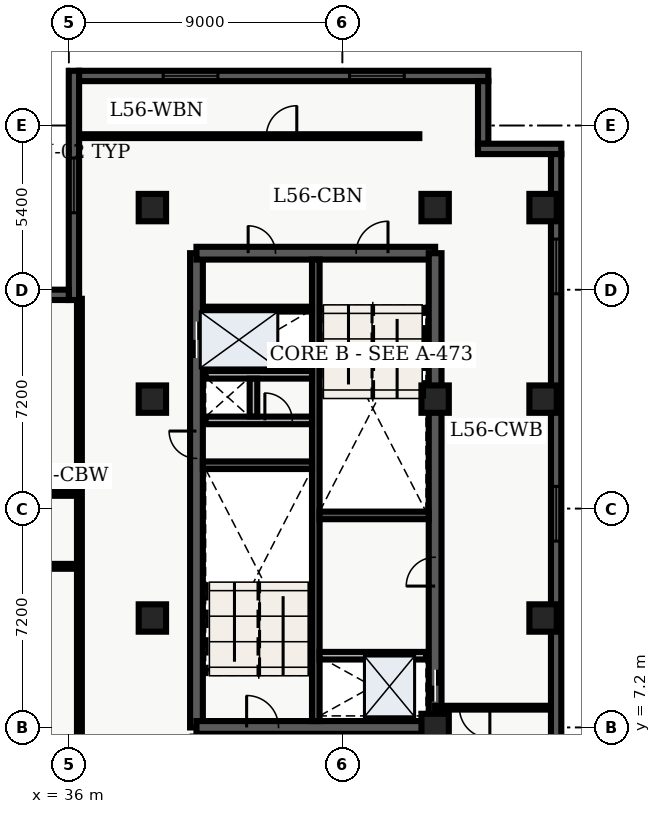
"""IFC4 building model, lengths in metres.
Left out: names, types, materials, properties, quantities, classifications, styles, units other than length and angle.
Written with IfcOpenShell. Run it as: python <this file> out.ifc"""

import sys

from ifc_helpers import new_model, entity, si_unit, converted_unit, direction, frame, origin_with_axes, origin_2d_with_axis, place, context, subcontext, project, spatial, polyline, rectangle, outline, extrude, element, fill, save


model = new_model("IFC4")
c1 = context("Model", 3, precision=1e-05, world=origin_with_axes(), true_north=direction((0.0, 1.0)))
c2 = subcontext(c1, "Body", "Model", "MODEL_VIEW")
j1 = project(units=[si_unit("LENGTHUNIT", "METRE"), converted_unit("PLANEANGLEUNIT", "DEGREE", entity("IfcPlaneAngleMeasure", 0.017), si_unit("PLANEANGLEUNIT", "RADIAN"), dimensions=[0, 0, 0, 0, 0, 0, 0])], contexts=[c1])
p1 = place(None, origin_with_axes())
s1 = spatial("IfcSite", under=j1, at=p1, CompositionType="ELEMENT")
p2 = place(p1, origin_with_axes())
s2 = spatial("IfcBuilding", under=s1, at=p2, CompositionType="ELEMENT")
p3 = place(p2, frame((0.0, 0.0, 228.6), z_axis=(0.0, 0.0, 1.0), x_axis=(1.0, 0.0, 0.0)))
s3 = spatial("IfcBuildingStorey", under=s2, at=p3, CompositionType="ELEMENT", Elevation=228.6)
p4 = place(p3, frame((40.2, 7.2, 0.0), z_axis=(0.0, 0.0, 1.0), x_axis=(0.0, 1.0, 0.0)))
e1 = element("IfcWall", 1, at=p4, inside=s3, PredefinedType="SHEAR", context=c2, shape_type="SweptSolid", body=[
    extrude(outline(polyline([(0.0, -0.21), (15.6, -0.21), (15.6, 0.21), (0.0, 0.21), (0.0, -0.21)])), origin_with_axes(), (0.0, 0.0, 1.0), 3.66),
])
p5 = place(p4, frame((12.75, 0.0, 0.0), z_axis=(0.0, 0.0, 1.0), x_axis=(1.0, 0.0, 0.0)))
e2 = element("IfcOpeningElement", 2, at=p5, cuts=e1, PredefinedType="OPENING", context=c2, shape_type="SweptSolid", body=[
    extrude(rectangle(XDim=1.2, YDim=0.44, at=origin_2d_with_axis()), origin_with_axes(), (0.0, 0.0, 1.0), 2.15),
])
p6 = place(p4, frame((9.3, 0.0, 0.0), z_axis=(0.0, 0.0, 1.0), x_axis=(1.0, 0.0, 0.0)))
e3 = element("IfcOpeningElement", 3, at=p6, cuts=e1, PredefinedType="OPENING", context=c2, shape_type="SweptSolid", body=[
    extrude(rectangle(XDim=0.9, YDim=0.44, at=origin_2d_with_axis()), origin_with_axes(), (0.0, 0.0, 1.0), 2.15),
])
p7 = place(p3, frame((40.2, 7.2, 0.0), z_axis=(0.0, 0.0, 1.0), x_axis=(1.0, 0.0, 0.0)))
e4 = element("IfcWall", 4, at=p7, inside=s3, PredefinedType="SHEAR", context=c2, shape_type="SweptSolid", body=[
    extrude(outline(polyline([(0.0, -0.21), (7.85, -0.21), (7.85, 0.21), (0.0, 0.21), (0.0, -0.21)])), origin_with_axes(), (0.0, 0.0, 1.0), 3.66),
])
p8 = place(p7, frame((2.175, 0.0, 0.0), z_axis=(0.0, 0.0, 1.0), x_axis=(1.0, 0.0, 0.0)))
e5 = element("IfcOpeningElement", 5, at=p8, cuts=e4, PredefinedType="OPENING", context=c2, shape_type="SweptSolid", body=[
    extrude(rectangle(XDim=1.05, YDim=0.44, at=origin_2d_with_axis()), origin_with_axes(), (0.0, 0.0, 1.0), 2.15),
])
p9 = place(p3, frame((40.2, 22.8, 0.0), z_axis=(0.0, 0.0, 1.0), x_axis=(1.0, 0.0, 0.0)))
e6 = element("IfcWall", 6, at=p9, inside=s3, PredefinedType="SHEAR", context=c2, shape_type="SweptSolid", body=[
    extrude(outline(polyline([(0.0, -0.21), (7.85, -0.21), (7.85, 0.21), (0.0, 0.21), (0.0, -0.21)])), origin_with_axes(), (0.0, 0.0, 1.0), 3.66),
])
p10 = place(p9, frame((5.775, 0.0, 0.0), z_axis=(0.0, 0.0, 1.0), x_axis=(1.0, 0.0, 0.0)))
e7 = element("IfcOpeningElement", 7, at=p10, cuts=e6, PredefinedType="OPENING", context=c2, shape_type="SweptSolid", body=[
    extrude(rectangle(XDim=1.05, YDim=0.44, at=origin_2d_with_axis()), origin_with_axes(), (0.0, 0.0, 1.0), 2.15),
])
p11 = place(p9, frame((2.15, 0.0, 0.0), z_axis=(0.0, 0.0, 1.0), x_axis=(1.0, 0.0, 0.0)))
e8 = element("IfcOpeningElement", 8, at=p11, cuts=e6, PredefinedType="OPENING", context=c2, shape_type="SweptSolid", body=[
    extrude(rectangle(XDim=0.9, YDim=0.44, at=origin_2d_with_axis()), origin_with_axes(), (0.0, 0.0, 1.0), 2.15),
])
p12 = place(p3, frame((48.05, 7.2, 0.0), z_axis=(0.0, 0.0, 1.0), x_axis=(0.0, 1.0, 0.0)))
e9 = element("IfcWall", 9, at=p12, inside=s3, PredefinedType="SHEAR", context=c2, shape_type="SweptSolid", body=[
    extrude(outline(polyline([(0.0, -0.21), (15.6, -0.21), (15.6, 0.21), (0.0, 0.21), (0.0, -0.21)])), origin_with_axes(), (0.0, 0.0, 1.0), 3.66),
])
p13 = place(p12, frame((1.375, 0.0, 0.0), z_axis=(0.0, 0.0, 1.0), x_axis=(1.0, 0.0, 0.0)))
e10 = element("IfcOpeningElement", 10, at=p13, cuts=e9, PredefinedType="OPENING", context=c2, shape_type="SweptSolid", body=[
    extrude(rectangle(XDim=1.05, YDim=0.44, at=origin_2d_with_axis()), origin_with_axes(), (0.0, 0.0, 1.0), 2.15),
])
p14 = place(p12, frame((5.125, 0.0, 0.0), z_axis=(0.0, 0.0, 1.0), x_axis=(1.0, 0.0, 0.0)))
e11 = element("IfcOpeningElement", 11, at=p14, cuts=e9, PredefinedType="OPENING", context=c2, shape_type="SweptSolid", body=[
    extrude(rectangle(XDim=0.95, YDim=0.44, at=origin_2d_with_axis()), origin_with_axes(), (0.0, 0.0, 1.0), 2.15),
])
p15 = place(p3, frame((44.125, 7.41, 0.0), z_axis=(0.0, 0.0, 1.0), x_axis=(0.0, 1.0, 0.0)))
e12 = element("IfcWall", 12, at=p15, inside=s3, PredefinedType="SHEAR", context=c2, shape_type="SweptSolid", body=[
    extrude(outline(polyline([(0.0, -0.125), (15.18, -0.125), (15.18, 0.125), (0.0, 0.125), (0.0, -0.125)])), origin_with_axes(), (0.0, 0.0, 1.0), 3.66),
])
for number, where, z_axis, x_axis in (
    (13, (40.41, 15.825, 0.0), (0.0, 0.0, 1.0), (1.0, 0.0, 0.0)),
    (14, (44.25, 14.175, 0.0), (0.0, 0.0, 1.0), (1.0, 0.0, 0.0)),
):
    element("IfcWall", number, at=place(p3, frame(where, z_axis=z_axis, x_axis=x_axis)), inside=s3, PredefinedType="SHEAR", context=c2, shape_type="SweptSolid", body=[
        extrude(outline(polyline([(0.0, -0.125), (3.59, -0.125), (3.59, 0.125), (0.0, 0.125), (0.0, -0.125)])), origin_with_axes(), (0.0, 0.0, 1.0), 3.66),
    ])
p16 = place(p3, frame((40.5, 17.3, 0.0), z_axis=(0.0, 0.0, 1.0), x_axis=(1.0, 0.0, 0.0)))
e15 = element("IfcWall", 15, at=p16, inside=s3, PredefinedType="SOLIDWALL", context=c2, shape_type="SweptSolid", body=[
    extrude(outline(polyline([(0.0, -0.125), (3.5, -0.125), (3.5, 0.125), (0.0, 0.125), (0.0, -0.125)])), origin_with_axes(), (0.0, 0.0, 1.0), 2.7),
])
p17 = place(p16, frame((2.4, 0.0, 0.0), z_axis=(0.0, 0.0, 1.0), x_axis=(1.0, 0.0, 0.0)))
e16 = element("IfcOpeningElement", 16, at=p17, cuts=e15, PredefinedType="OPENING", context=c2, shape_type="SweptSolid", body=[
    extrude(rectangle(XDim=0.9, YDim=0.27, at=origin_2d_with_axis()), origin_with_axes(), (0.0, 0.0, 1.0), 2.15),
])
p18 = place(p3, frame((40.5, 18.8, 0.0), z_axis=(0.0, 0.0, 1.0), x_axis=(1.0, 0.0, 0.0)))
e17 = element("IfcWall", 17, at=p18, inside=s3, PredefinedType="SOLIDWALL", context=c2, shape_type="SweptSolid", body=[
    extrude(outline(polyline([(0.0, -0.125), (3.5, -0.125), (3.5, 0.125), (0.0, 0.125), (0.0, -0.125)])), origin_with_axes(), (0.0, 0.0, 1.0), 2.7),
])
p19 = place(p3, frame((42.075, 17.43, 0.0), z_axis=(0.0, 0.0, 1.0), x_axis=(0.0, 1.0, 0.0)))
e18 = element("IfcWall", 18, at=p19, inside=s3, PredefinedType="SOLIDWALL", context=c2, shape_type="SweptSolid", body=[
    extrude(outline(polyline([(0.0, -0.125), (1.24, -0.125), (1.24, 0.125), (0.0, 0.125), (0.0, -0.125)])), origin_with_axes(), (0.0, 0.0, 1.0), 2.7),
])
for number, where, z_axis, x_axis in (
    (19, (38.75, 10.8, 0.0), (0.0, 0.0, 1.0), (1.0, 0.0, 0.0)),
    (20, (38.75, 18.0, 0.0), (0.0, 0.0, 1.0), (1.0, 0.0, 0.0)),
    (21, (38.75, 24.3, 0.0), (0.0, 0.0, 1.0), (1.0, 0.0, 0.0)),
    (22, (48.05, 7.2, 0.0), (0.0, 0.0, 1.0), (1.0, 0.0, 0.0)),
    (23, (48.05, 18.0, 0.0), (0.0, 0.0, 1.0), (1.0, 0.0, 0.0)),
    (24, (48.05, 24.3, 0.0), (0.0, 0.0, 1.0), (1.0, 0.0, 0.0)),
    (25, (51.6, 10.8, 0.0), (0.0, 0.0, 1.0), (1.0, 0.0, 0.0)),
    (26, (51.6, 18.0, 0.0), (0.0, 0.0, 1.0), (1.0, 0.0, 0.0)),
    (27, (51.6, 24.3, 0.0), (0.0, 0.0, 1.0), (1.0, 0.0, 0.0)),
):
    element("IfcColumn", number, at=place(p3, frame(where, z_axis=z_axis, x_axis=x_axis)), inside=s3, PredefinedType="COLUMN", context=c2, shape_type="SweptSolid", body=[
        extrude(rectangle(XDim=0.9, YDim=0.9, at=origin_2d_with_axis()), origin_with_axes(), (0.0, 0.0, 1.0), 3.9),
    ])
p20 = place(p3, frame((40.5, 20.96, 0.0), z_axis=(0.0, 0.0, 1.0), x_axis=(1.0, 0.0, 0.0)))
e28 = element("IfcWall", 28, at=p20, inside=s3, PredefinedType="PARTITIONING", context=c2, shape_type="SweptSolid", body=[
    extrude(outline(polyline([(0.0, -0.08), (3.5, -0.08), (3.5, 0.08), (0.0, 0.08), (0.0, -0.08)])), origin_with_axes(), (0.0, 0.0, 1.0), 2.7),
])
p21 = place(p3, frame((44.25, 9.56, 0.0), z_axis=(0.0, 0.0, 1.0), x_axis=(1.0, 0.0, 0.0)))
e29 = element("IfcWall", 29, at=p21, inside=s3, PredefinedType="SOLIDWALL", context=c2, shape_type="SweptSolid", body=[
    extrude(outline(polyline([(0.0, -0.125), (3.5, -0.125), (3.5, 0.125), (0.0, 0.125), (0.0, -0.125)])), origin_with_axes(), (0.0, 0.0, 1.0), 2.7),
])
p22 = place(p3, frame((20.3, 12.5, 0.0), z_axis=(0.0, 0.0, 1.0), x_axis=(1.0, 0.0, 0.0)))
e30 = element("IfcWall", 30, at=p22, inside=s3, PredefinedType="PARTITIONING", context=c2, shape_type="SweptSolid", body=[
    extrude(outline(polyline([(0.0, -0.08), (16.05, -0.08), (16.05, 0.08), (0.0, 0.08), (0.0, -0.08)])), origin_with_axes(), (0.0, 0.0, 1.0), 2.7),
])
p23 = place(p22, frame((3.865, 0.0, 0.0), z_axis=(0.0, 0.0, 1.0), x_axis=(1.0, 0.0, 0.0)))
e31 = element("IfcOpeningElement", 31, at=p23, cuts=e30, PredefinedType="OPENING", context=c2, shape_type="SweptSolid", body=[
    extrude(rectangle(XDim=1.2, YDim=0.18, at=origin_2d_with_axis()), origin_with_axes(), (0.0, 0.0, 1.0), 2.2),
])
p24 = place(p22, frame((9.48, 0.0, 0.0), z_axis=(0.0, 0.0, 1.0), x_axis=(1.0, 0.0, 0.0)))
e32 = element("IfcOpeningElement", 32, at=p24, cuts=e30, PredefinedType="OPENING", context=c2, shape_type="SweptSolid", body=[
    extrude(rectangle(XDim=1.0, YDim=0.18, at=origin_2d_with_axis()), origin_with_axes(), (0.0, 0.0, 1.0), 2.15),
])
p25 = place(p22, frame((13.691, 0.0, 0.0), z_axis=(0.0, 0.0, 1.0), x_axis=(1.0, 0.0, 0.0)))
e33 = element("IfcOpeningElement", 33, at=p25, cuts=e30, PredefinedType="OPENING", context=c2, shape_type="SweptSolid", body=[
    extrude(rectangle(XDim=1.0, YDim=0.18, at=origin_2d_with_axis()), origin_with_axes(), (0.0, 0.0, 1.0), 2.15),
])
p26 = place(p3, frame((20.3, 14.9, 0.0), z_axis=(0.0, 0.0, 1.0), x_axis=(1.0, 0.0, 0.0)))
e34 = element("IfcWall", 34, at=p26, inside=s3, PredefinedType="PARTITIONING", context=c2, shape_type="SweptSolid", body=[
    extrude(outline(polyline([(0.0, -0.08), (16.05, -0.08), (16.05, 0.08), (0.0, 0.08), (0.0, -0.08)])), origin_with_axes(), (0.0, 0.0, 1.0), 2.7),
])
p27 = place(p26, frame((8.075, 0.0, 0.0), z_axis=(0.0, 0.0, 1.0), x_axis=(1.0, 0.0, 0.0)))
e35 = element("IfcOpeningElement", 35, at=p27, cuts=e34, PredefinedType="OPENING", context=c2, shape_type="SweptSolid", body=[
    extrude(rectangle(XDim=1.2, YDim=0.18, at=origin_2d_with_axis()), origin_with_axes(), (0.0, 0.0, 1.0), 2.2),
])
p28 = place(p3, frame((36.35, 4.35, 0.0), z_axis=(0.0, 0.0, 1.0), x_axis=(0.0, 1.0, 0.0)))
e36 = element("IfcWall", 36, at=p28, inside=s3, PredefinedType="PARTITIONING", context=c2, shape_type="SweptSolid", body=[
    extrude(outline(polyline([(0.0, -0.08), (16.95, -0.08), (16.95, 0.08), (0.0, 0.08), (0.0, -0.08)])), origin_with_axes(), (0.0, 0.0, 1.0), 2.7),
])
p29 = place(p3, frame((51.865, 7.85, 0.0), z_axis=(0.0, 0.0, 1.0), x_axis=(-1.0, 0.0, 0.0)))
e37 = element("IfcWall", 37, at=p29, inside=s3, PredefinedType="PARTITIONING", context=c2, shape_type="SweptSolid", body=[
    extrude(outline(polyline([(0.0, -0.062), (3.815, -0.062), (3.815, 0.062), (0.0, 0.062), (0.0, -0.062)])), origin_with_axes(), (0.0, 0.0, 1.0), 2.7),
])
p30 = place(p29, frame((2.515, 0.0, 0.0), z_axis=(0.0, 0.0, 1.0), x_axis=(1.0, 0.0, 0.0)))
e38 = element("IfcOpeningElement", 38, at=p30, cuts=e37, PredefinedType="OPENING", context=c2, shape_type="SweptSolid", body=[
    extrude(rectangle(XDim=1.0, YDim=0.145, at=origin_2d_with_axis()), origin_with_axes(), (0.0, 0.0, 1.0), 2.15),
])
p31 = place(p3, frame((36.335, 26.65, 0.0), z_axis=(0.0, 0.0, 1.0), x_axis=(1.0, 0.0, 0.0)))
e39 = element("IfcWall", 39, at=p31, inside=s3, PredefinedType="PARTITIONING", context=c2, shape_type="SweptSolid", body=[
    extrude(outline(polyline([(0.0, -0.062), (11.195, -0.062), (11.195, 0.062), (0.0, 0.062), (0.0, -0.062)])), origin_with_axes(), (0.0, 0.0, 1.0), 2.7),
])
p32 = place(p31, frame((6.665, 0.0, 0.0), z_axis=(0.0, 0.0, 1.0), x_axis=(1.0, 0.0, 0.0)))
e40 = element("IfcOpeningElement", 40, at=p32, cuts=e39, PredefinedType="OPENING", context=c2, shape_type="SweptSolid", body=[
    extrude(rectangle(XDim=1.0, YDim=0.145, at=origin_2d_with_axis()), origin_with_axes(), (0.0, 0.0, 1.0), 2.15),
])
p33 = place(p3, frame((36.17, 21.26, 0.0), z_axis=(0.0, 0.0, 1.0), x_axis=(0.0, 1.0, 0.0)))
e41 = element("IfcWall", 41, at=p33, inside=s3, PredefinedType="SOLIDWALL", context=c2, shape_type="SweptSolid", body=[
    extrude(outline(polyline([(0.0, -0.17), (7.54, -0.17), (7.54, 0.17), (0.0, 0.17), (0.0, -0.17)])), origin_with_axes(), (0.0, 0.0, 1.0), 3.66),
])
p34 = place(p33, frame((3.77, 0.0, 0.45), z_axis=(0.0, 0.0, 1.0), x_axis=(1.0, 0.0, 0.0)))
e42 = element("IfcOpeningElement", 42, at=p34, cuts=e41, PredefinedType="OPENING", context=c2, shape_type="SweptSolid", body=[
    extrude(rectangle(XDim=1.8, YDim=0.36, at=origin_2d_with_axis()), origin_with_axes(), (0.0, 0.0, 1.0), 2.1),
])
p35 = place(p3, frame((36.34, 28.63, 0.0), z_axis=(0.0, 0.0, 1.0), x_axis=(1.0, 0.0, 0.0)))
e43 = element("IfcWall", 43, at=p35, inside=s3, PredefinedType="SOLIDWALL", context=c2, shape_type="SweptSolid", body=[
    extrude(outline(polyline([(0.0, -0.17), (13.46, -0.17), (13.46, 0.17), (0.0, 0.17), (0.0, -0.17)])), origin_with_axes(), (0.0, 0.0, 1.0), 3.66),
])
p36 = place(p35, frame((3.665, 0.0, 0.45), z_axis=(0.0, 0.0, 1.0), x_axis=(1.0, 0.0, 0.0)))
e44 = element("IfcOpeningElement", 44, at=p36, cuts=e43, PredefinedType="OPENING", context=c2, shape_type="SweptSolid", body=[
    extrude(rectangle(XDim=1.8, YDim=0.36, at=origin_2d_with_axis()), origin_with_axes(), (0.0, 0.0, 1.0), 2.1),
])
p37 = place(p35, frame((9.795, 0.0, 0.45), z_axis=(0.0, 0.0, 1.0), x_axis=(1.0, 0.0, 0.0)))
e45 = element("IfcOpeningElement", 45, at=p37, cuts=e43, PredefinedType="OPENING", context=c2, shape_type="SweptSolid", body=[
    extrude(rectangle(XDim=1.8, YDim=0.36, at=origin_2d_with_axis()), origin_with_axes(), (0.0, 0.0, 1.0), 2.1),
])
p38 = place(p3, frame((49.63, 28.46, 0.0), z_axis=(0.0, 0.0, 1.0), x_axis=(0.0, -1.0, 0.0)))
e46 = element("IfcWall", 46, at=p38, inside=s3, PredefinedType="SOLIDWALL", context=c2, shape_type="SweptSolid", body=[
    extrude(outline(polyline([(0.0, -0.17), (2.06, -0.17), (2.06, 0.17), (0.0, 0.17), (0.0, -0.17)])), origin_with_axes(), (0.0, 0.0, 1.0), 3.66),
])
p39 = place(p3, frame((49.46, 26.23, 0.0), z_axis=(0.0, 0.0, 1.0), x_axis=(1.0, 0.0, 0.0)))
e47 = element("IfcWall", 47, at=p39, inside=s3, PredefinedType="SOLIDWALL", context=c2, shape_type="SweptSolid", body=[
    extrude(outline(polyline([(0.0, -0.17), (2.74, -0.17), (2.74, 0.17), (0.0, 0.17), (0.0, -0.17)])), origin_with_axes(), (0.0, 0.0, 1.0), 3.66),
])
p40 = place(p3, frame((52.03, 26.06, 0.0), z_axis=(0.0, 0.0, 1.0), x_axis=(0.0, -1.0, 0.0)))
e48 = element("IfcWall", 48, at=p40, inside=s3, PredefinedType="SOLIDWALL", context=c2, shape_type="SweptSolid", body=[
    extrude(outline(polyline([(0.0, -0.17), (23.66, -0.17), (23.66, 0.17), (0.0, 0.17), (0.0, -0.17)])), origin_with_axes(), (0.0, 0.0, 1.0), 3.66),
])
p41 = place(p40, frame((3.696, 0.0, 0.45), z_axis=(0.0, 0.0, 1.0), x_axis=(1.0, 0.0, 0.0)))
e49 = element("IfcOpeningElement", 49, at=p41, cuts=e48, PredefinedType="OPENING", context=c2, shape_type="SweptSolid", body=[
    extrude(rectangle(XDim=1.8, YDim=0.36, at=origin_2d_with_axis()), origin_with_axes(), (0.0, 0.0, 1.0), 2.1),
])
p42 = place(p40, frame((11.83, 0.0, 0.45), z_axis=(0.0, 0.0, 1.0), x_axis=(1.0, 0.0, 0.0)))
e50 = element("IfcOpeningElement", 50, at=p42, cuts=e48, PredefinedType="OPENING", context=c2, shape_type="SweptSolid", body=[
    extrude(rectangle(XDim=1.8, YDim=0.36, at=origin_2d_with_axis()), origin_with_axes(), (0.0, 0.0, 1.0), 2.1),
])
p43 = place(p40, frame((20.364, 0.0, 0.45), z_axis=(0.0, 0.0, 1.0), x_axis=(1.0, 0.0, 0.0)))
e51 = element("IfcOpeningElement", 51, at=p43, cuts=e48, PredefinedType="OPENING", context=c2, shape_type="SweptSolid", body=[
    extrude(rectangle(XDim=1.8, YDim=0.36, at=origin_2d_with_axis()), origin_with_axes(), (0.0, 0.0, 1.0), 2.1),
])
p44 = place(p3, frame((32.06, 21.43, 0.0), z_axis=(0.0, 0.0, 1.0), x_axis=(1.0, 0.0, 0.0)))
e52 = element("IfcWall", 52, at=p44, inside=s3, PredefinedType="SOLIDWALL", context=c2, shape_type="SweptSolid", body=[
    extrude(outline(polyline([(0.0, -0.17), (3.94, -0.17), (3.94, 0.17), (0.0, 0.17), (0.0, -0.17)])), origin_with_axes(), (0.0, 0.0, 1.0), 3.66),
])
p45 = place(p12, frame((1.375, 0.0, 0.0), z_axis=(0.0, 0.0, 1.0), x_axis=(1.0, 0.0, 0.0)))
e53 = element("IfcDoor", 53, at=p45, inside=s3, OperationType="SLIDING_TO_LEFT", PredefinedType="DOOR", context=c2, shape_type="SweptSolid", body=[
    extrude(rectangle(XDim=1.05, YDim=0.09, at=origin_2d_with_axis()), origin_with_axes(), (0.0, 0.0, 1.0), 2.15),
])
fill(e10, e53)
p46 = place(p4, frame((12.75, 0.0, 0.0), z_axis=(0.0, 0.0, 1.0), x_axis=(1.0, 0.0, 0.0)))
e54 = element("IfcDoor", 54, at=p46, inside=s3, OperationType="DOUBLE_DOOR_SLIDING", PredefinedType="DOOR", context=c2, shape_type="SweptSolid", body=[
    extrude(rectangle(XDim=1.2, YDim=0.09, at=origin_2d_with_axis()), origin_with_axes(), (0.0, 0.0, 1.0), 2.15),
])
fill(e2, e54)
p47 = place(p4, frame((9.3, 0.0, 0.0), z_axis=(0.0, 0.0, 1.0), x_axis=(1.0, 0.0, 0.0)))
e55 = element("IfcDoor", 55, at=p47, inside=s3, OperationType="SINGLE_SWING_RIGHT", PredefinedType="DOOR", context=c2, shape_type="SweptSolid", body=[
    extrude(rectangle(XDim=0.9, YDim=0.09, at=origin_2d_with_axis()), origin_with_axes(), (0.0, 0.0, 1.0), 2.15),
])
fill(e3, e55)
p48 = place(p16, frame((2.4, 0.0, 0.0), z_axis=(0.0, 0.0, 1.0), x_axis=(1.0, 0.0, 0.0)))
e56 = element("IfcDoor", 56, at=p48, inside=s3, OperationType="SINGLE_SWING_LEFT", PredefinedType="DOOR", context=c2, shape_type="SweptSolid", body=[
    extrude(rectangle(XDim=0.9, YDim=0.09, at=origin_2d_with_axis()), origin_with_axes(), (0.0, 0.0, 1.0), 2.15),
])
fill(e16, e56)
p49 = place(p7, frame((2.175, 0.0, 0.0), z_axis=(0.0, 0.0, 1.0), x_axis=(1.0, 0.0, 0.0)))
e57 = element("IfcDoor", 57, at=p49, inside=s3, OperationType="SINGLE_SWING_LEFT", PredefinedType="DOOR", context=c2, shape_type="SweptSolid", body=[
    extrude(rectangle(XDim=1.05, YDim=0.09, at=origin_2d_with_axis()), origin_with_axes(), (0.0, 0.0, 1.0), 2.15),
])
fill(e5, e57)
p50 = place(p9, frame((5.775, 0.0, 0.0), z_axis=(0.0, 0.0, 1.0), x_axis=(1.0, 0.0, 0.0)))
e58 = element("IfcDoor", 58, at=p50, inside=s3, OperationType="SINGLE_SWING_RIGHT", PredefinedType="DOOR", context=c2, shape_type="SweptSolid", body=[
    extrude(rectangle(XDim=1.05, YDim=0.09, at=origin_2d_with_axis()), origin_with_axes(), (0.0, 0.0, 1.0), 2.15),
])
fill(e7, e58)
p51 = place(p9, frame((2.15, 0.0, 0.0), z_axis=(0.0, 0.0, 1.0), x_axis=(1.0, 0.0, 0.0)))
e59 = element("IfcDoor", 59, at=p51, inside=s3, OperationType="SINGLE_SWING_LEFT", PredefinedType="DOOR", context=c2, shape_type="SweptSolid", body=[
    extrude(rectangle(XDim=0.9, YDim=0.09, at=origin_2d_with_axis()), origin_with_axes(), (0.0, 0.0, 1.0), 2.15),
])
fill(e8, e59)
p52 = place(p12, frame((5.125, 0.0, 0.0), z_axis=(0.0, 0.0, 1.0), x_axis=(1.0, 0.0, 0.0)))
e60 = element("IfcDoor", 60, at=p52, inside=s3, OperationType="SINGLE_SWING_LEFT", PredefinedType="DOOR", context=c2, shape_type="SweptSolid", body=[
    extrude(rectangle(XDim=0.95, YDim=0.09, at=origin_2d_with_axis()), origin_with_axes(), (0.0, 0.0, 1.0), 2.15),
])
fill(e11, e60)
p53 = place(p29, frame((2.515, 0.0, 0.0), z_axis=(0.0, 0.0, 1.0), x_axis=(1.0, 0.0, 0.0)))
e61 = element("IfcDoor", 61, at=p53, inside=s3, OperationType="SINGLE_SWING_LEFT", PredefinedType="DOOR", context=c2, shape_type="SweptSolid", body=[
    extrude(rectangle(XDim=1.0, YDim=0.075, at=origin_2d_with_axis()), origin_with_axes(), (0.0, 0.0, 1.0), 2.15),
])
fill(e38, e61)
p54 = place(p31, frame((6.665, 0.0, 0.0), z_axis=(0.0, 0.0, 1.0), x_axis=(1.0, 0.0, 0.0)))
e62 = element("IfcDoor", 62, at=p54, inside=s3, OperationType="SINGLE_SWING_RIGHT", PredefinedType="DOOR", context=c2, shape_type="SweptSolid", body=[
    extrude(rectangle(XDim=1.0, YDim=0.075, at=origin_2d_with_axis()), origin_with_axes(), (0.0, 0.0, 1.0), 2.15),
])
fill(e40, e62)
p55 = place(p33, frame((3.77, 0.0, 0.45), z_axis=(0.0, 0.0, 1.0), x_axis=(1.0, 0.0, 0.0)))
e63 = element("IfcWindow", 63, at=p55, inside=s3, PredefinedType="WINDOW", context=c2, shape_type="SweptSolid", body=[
    extrude(rectangle(XDim=1.8, YDim=0.09, at=origin_2d_with_axis()), origin_with_axes(), (0.0, 0.0, 1.0), 2.1),
])
fill(e42, e63)
p56 = place(p35, frame((3.665, 0.0, 0.45), z_axis=(0.0, 0.0, 1.0), x_axis=(1.0, 0.0, 0.0)))
e64 = element("IfcWindow", 64, at=p56, inside=s3, PredefinedType="WINDOW", context=c2, shape_type="SweptSolid", body=[
    extrude(rectangle(XDim=1.8, YDim=0.09, at=origin_2d_with_axis()), origin_with_axes(), (0.0, 0.0, 1.0), 2.1),
])
fill(e44, e64)
p57 = place(p35, frame((9.795, 0.0, 0.45), z_axis=(0.0, 0.0, 1.0), x_axis=(1.0, 0.0, 0.0)))
e65 = element("IfcWindow", 65, at=p57, inside=s3, PredefinedType="WINDOW", context=c2, shape_type="SweptSolid", body=[
    extrude(rectangle(XDim=1.8, YDim=0.09, at=origin_2d_with_axis()), origin_with_axes(), (0.0, 0.0, 1.0), 2.1),
])
fill(e45, e65)
p58 = place(p40, frame((3.696, 0.0, 0.45), z_axis=(0.0, 0.0, 1.0), x_axis=(1.0, 0.0, 0.0)))
e66 = element("IfcWindow", 66, at=p58, inside=s3, PredefinedType="WINDOW", context=c2, shape_type="SweptSolid", body=[
    extrude(rectangle(XDim=1.8, YDim=0.09, at=origin_2d_with_axis()), origin_with_axes(), (0.0, 0.0, 1.0), 2.1),
])
fill(e49, e66)
p59 = place(p40, frame((11.83, 0.0, 0.45), z_axis=(0.0, 0.0, 1.0), x_axis=(1.0, 0.0, 0.0)))
e67 = element("IfcWindow", 67, at=p59, inside=s3, PredefinedType="WINDOW", context=c2, shape_type="SweptSolid", body=[
    extrude(rectangle(XDim=1.8, YDim=0.09, at=origin_2d_with_axis()), origin_with_axes(), (0.0, 0.0, 1.0), 2.1),
])
fill(e50, e67)
save(model, sys.argv[1])
